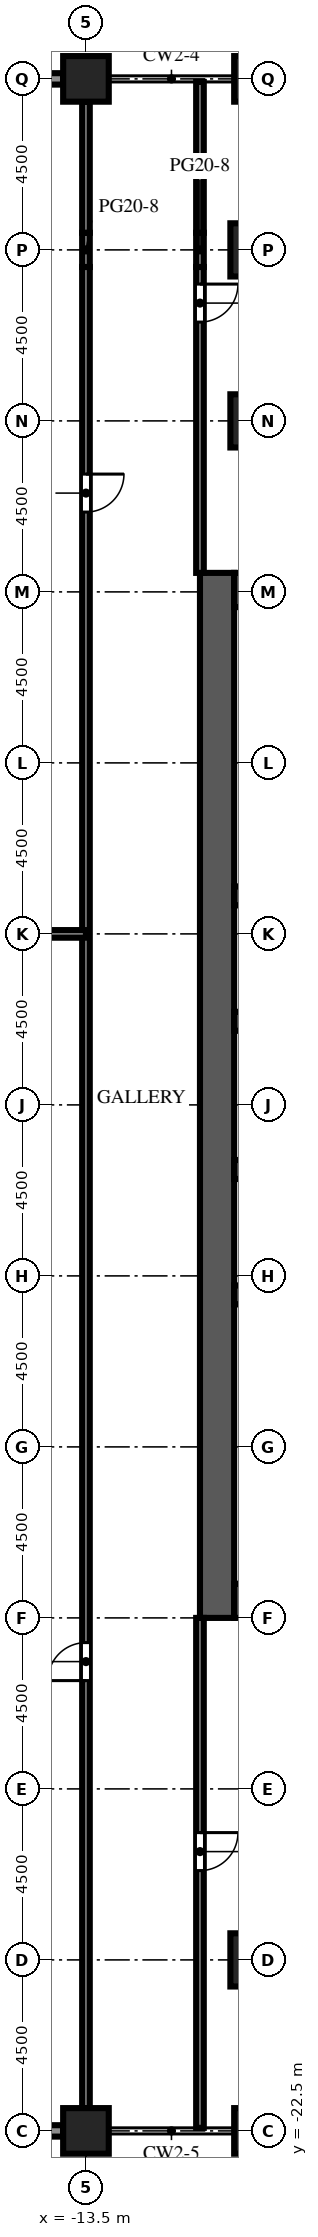
"""IFC4 building model, lengths in metres.
Left out: names, types, materials, properties, quantities, classifications, styles, units other than length and angle.
Written with IfcOpenShell. Run it as: python <this file> out.ifc"""

import sys

from ifc_helpers import new_model, si_unit, direction, frame, frame_2d, origin, origin_2d, place, context, subcontext, project, spatial, rectangle, extrude, element, fill, save


model = new_model("IFC4")
c1 = context("Model", 3, precision=1e-05, world=origin(), true_north=direction((0.0, 1.0)))
c2 = subcontext(c1, "Body", "Model", "MODEL_VIEW")
j1 = project(units=[si_unit("LENGTHUNIT", "METRE"), si_unit("PLANEANGLEUNIT", "RADIAN")], contexts=[c1])
p1 = place(None, origin())
s1 = spatial("IfcSite", under=j1, at=p1, CompositionType="ELEMENT")
p2 = place(p1, origin())
s2 = spatial("IfcBuilding", under=s1, at=p2, CompositionType="ELEMENT")
p3 = place(p2, frame((0.0, 0.0, 145.4)))
s3 = spatial("IfcBuildingStorey", under=s2, at=p3, CompositionType="ELEMENT", Elevation=145.4)
for number, where, z_axis, x_axis in (
    (1, (-13.5, -22.5, 0.0), (0.0, 0.0, 1.0), (1.0, 0.0, 0.0)),
    (2, (-13.5, 31.5, 0.0), (0.0, 0.0, 1.0), (1.0, 0.0, 0.0)),
    (3, (-9.0, -22.5, 0.0), (0.0, 0.0, 1.0), (1.0, 0.0, 0.0)),
    (4, (-9.0, 31.5, 0.0), (0.0, 0.0, 1.0), (1.0, 0.0, 0.0)),
):
    element("IfcColumn", number, at=place(p3, frame(where, z_axis=z_axis, x_axis=x_axis)), inside=s3, PredefinedType="COLUMN", context=c2, shape_type="SweptSolid", body=[
        extrude(rectangle(XDim=1.2, YDim=1.2, at=origin_2d()), origin(), (0.0, 0.0, 1.0), 6.0),
    ])
for number, where, z_axis, x_axis in (
    (5, (-9.0, -18.0, 0.0), (0.0, 0.0, 1.0), (1.0, 0.0, 0.0)),
    (6, (-9.0, 22.5, 0.0), (0.0, 0.0, 1.0), (1.0, 0.0, 0.0)),
):
    element("IfcColumn", number, at=place(p3, frame(where, z_axis=z_axis, x_axis=x_axis)), inside=s3, PredefinedType="COLUMN", context=c2, shape_type="SweptSolid", body=[
        extrude(rectangle(XDim=1.4, YDim=1.4, at=origin_2d()), origin(), (0.0, 0.0, 1.0), 6.0),
    ])
p4 = place(p3, frame((-9.0, 27.0, 0.0), z_axis=(0.0, 0.0, 1.0), x_axis=(1.0, 0.0, 0.0)))
e7 = element("IfcColumn", 7, at=p4, inside=s3, PredefinedType="COLUMN", context=c2, shape_type="SweptSolid", body=[
    extrude(rectangle(XDim=1.4, YDim=1.4, at=origin_2d()), origin(), (0.0, 0.0, 1.0), 5.4),
])
p5 = place(p3, frame((-10.05, -9.0, 0.0), z_axis=(0.0, 0.0, 1.0), x_axis=(0.0, 1.0, 0.0)))
e8 = element("IfcWall", 8, at=p5, inside=s3, PredefinedType="SHEAR", context=c2, shape_type="SweptSolid", body=[
    extrude(rectangle(XDim=27.5, YDim=0.9, at=frame_2d((13.75, 0.0))), origin(), (0.0, 0.0, 1.0), 6.0),
])
p6 = place(p5, frame((12.55, 0.0, 0.0)))
e9 = element("IfcOpeningElement", 9, at=p6, cuts=e8, PredefinedType="OPENING", context=c2, shape_type="SweptSolid", body=[
    extrude(rectangle(XDim=2.4, YDim=2.4, at=frame_2d((1.2, 1.2))), frame((0.0, 0.46, 0.0), z_axis=(0.0, -1.0, 0.0), x_axis=(1.0, 0.0, 0.0)), (0.0, 0.0, 1.0), 0.92),
])
p7 = place(p5, frame((6.825, 0.0, 0.0)))
e10 = element("IfcOpeningElement", 10, at=p7, cuts=e8, PredefinedType="OPENING", context=c2, shape_type="SweptSolid", body=[
    extrude(rectangle(XDim=1.2, YDim=2.1, at=frame_2d((0.6, 1.05))), frame((0.0, 0.46, 0.0), z_axis=(0.0, -1.0, 0.0), x_axis=(1.0, 0.0, 0.0)), (0.0, 0.0, 1.0), 0.92),
])
p8 = place(p5, frame((19.475, 0.0, 0.0)))
e11 = element("IfcOpeningElement", 11, at=p8, cuts=e8, PredefinedType="OPENING", context=c2, shape_type="SweptSolid", body=[
    extrude(rectangle(XDim=1.2, YDim=2.1, at=frame_2d((0.6, 1.05))), frame((0.0, 0.46, 0.0), z_axis=(0.0, -1.0, 0.0), x_axis=(1.0, 0.0, 0.0)), (0.0, 0.0, 1.0), 0.92),
])
for number, where, z_axis, x_axis in (
    (12, (-9.6, -8.55, 0.0), (0.0, 0.0, 1.0), (1.0, 0.0, 0.0)),
    (13, (-9.6, 18.05, 0.0), (0.0, 0.0, 1.0), (1.0, 0.0, 0.0)),
):
    element("IfcWall", number, at=place(p3, frame(where, z_axis=z_axis, x_axis=x_axis)), inside=s3, PredefinedType="SHEAR", context=c2, shape_type="SweptSolid", body=[
        extrude(rectangle(XDim=10.2, YDim=0.9, at=frame_2d((5.1, 0.0))), origin(), (0.0, 0.0, 1.0), 6.0),
    ])
p9 = place(p3, frame((-9.6, -0.5, 0.0), z_axis=(0.0, 0.0, 1.0), x_axis=(1.0, 0.0, 0.0)))
e14 = element("IfcWall", 14, at=p9, inside=s3, PredefinedType="SHEAR", context=c2, shape_type="SweptSolid", body=[
    extrude(rectangle(XDim=10.2, YDim=0.5, at=frame_2d((5.1, 0.0))), origin(), (0.0, 0.0, 1.0), 6.0),
])
p10 = place(p3, frame((-9.6, 2.8, 0.0), z_axis=(0.0, 0.0, 1.0), x_axis=(1.0, 0.0, 0.0)))
e15 = element("IfcWall", 15, at=p10, inside=s3, PredefinedType="SHEAR", context=c2, shape_type="SweptSolid", body=[
    extrude(rectangle(XDim=10.2, YDim=0.5, at=frame_2d((5.1, 0.0))), origin(), (0.0, 0.0, 1.0), 6.0),
])
p11 = place(p10, frame((0.562, 0.0, 0.0)))
e16 = element("IfcOpeningElement", 16, at=p11, cuts=e15, PredefinedType="OPENING", context=c2, shape_type="SweptSolid", body=[
    extrude(rectangle(XDim=1.1, YDim=2.1, at=frame_2d((0.55, 1.05))), frame((0.0, 0.26, 0.0), z_axis=(0.0, -1.0, 0.0), x_axis=(1.0, 0.0, 0.0)), (0.0, 0.0, 1.0), 0.52),
])
p12 = place(p10, frame((3.238, 0.0, 0.0)))
e17 = element("IfcOpeningElement", 17, at=p12, cuts=e15, PredefinedType="OPENING", context=c2, shape_type="SweptSolid", body=[
    extrude(rectangle(XDim=1.1, YDim=2.1, at=frame_2d((0.55, 1.05))), frame((0.0, 0.26, 0.0), z_axis=(0.0, -1.0, 0.0), x_axis=(1.0, 0.0, 0.0)), (0.0, 0.0, 1.0), 0.52),
])
p13 = place(p10, frame((8.538, 0.0, 0.0)))
e18 = element("IfcOpeningElement", 18, at=p13, cuts=e15, PredefinedType="OPENING", context=c2, shape_type="SweptSolid", body=[
    extrude(rectangle(XDim=1.1, YDim=2.1, at=frame_2d((0.55, 1.05))), frame((0.0, 0.26, 0.0), z_axis=(0.0, -1.0, 0.0), x_axis=(1.0, 0.0, 0.0)), (0.0, 0.0, 1.0), 0.52),
])
p14 = place(p3, frame((-9.6, 6.7, 0.0), z_axis=(0.0, 0.0, 1.0), x_axis=(1.0, 0.0, 0.0)))
e19 = element("IfcWall", 19, at=p14, inside=s3, PredefinedType="SHEAR", context=c2, shape_type="SweptSolid", body=[
    extrude(rectangle(XDim=10.2, YDim=0.5, at=frame_2d((5.1, 0.0))), origin(), (0.0, 0.0, 1.0), 6.0),
])
p15 = place(p14, frame((0.562, 0.0, 0.0)))
e20 = element("IfcOpeningElement", 20, at=p15, cuts=e19, PredefinedType="OPENING", context=c2, shape_type="SweptSolid", body=[
    extrude(rectangle(XDim=1.1, YDim=2.1, at=frame_2d((0.55, 1.05))), frame((0.0, 0.26, 0.0), z_axis=(0.0, -1.0, 0.0), x_axis=(1.0, 0.0, 0.0)), (0.0, 0.0, 1.0), 0.52),
])
p16 = place(p14, frame((3.288, 0.0, 0.0)))
e21 = element("IfcOpeningElement", 21, at=p16, cuts=e19, PredefinedType="OPENING", context=c2, shape_type="SweptSolid", body=[
    extrude(rectangle(XDim=1.0, YDim=2.1, at=frame_2d((0.5, 1.05))), frame((0.0, 0.26, 0.0), z_axis=(0.0, -1.0, 0.0), x_axis=(1.0, 0.0, 0.0)), (0.0, 0.0, 1.0), 0.52),
])
p17 = place(p14, frame((5.913, 0.0, 0.0)))
e22 = element("IfcOpeningElement", 22, at=p17, cuts=e19, PredefinedType="OPENING", context=c2, shape_type="SweptSolid", body=[
    extrude(rectangle(XDim=1.0, YDim=2.1, at=frame_2d((0.5, 1.05))), frame((0.0, 0.26, 0.0), z_axis=(0.0, -1.0, 0.0), x_axis=(1.0, 0.0, 0.0)), (0.0, 0.0, 1.0), 0.52),
])
p18 = place(p14, frame((8.587, 0.0, 0.0)))
e23 = element("IfcOpeningElement", 23, at=p18, cuts=e19, PredefinedType="OPENING", context=c2, shape_type="SweptSolid", body=[
    extrude(rectangle(XDim=1.0, YDim=2.1, at=frame_2d((0.5, 1.05))), frame((0.0, 0.26, 0.0), z_axis=(0.0, -1.0, 0.0), x_axis=(1.0, 0.0, 0.0)), (0.0, 0.0, 1.0), 0.52),
])
p19 = place(p3, frame((-9.6, 10.0, 0.0), z_axis=(0.0, 0.0, 1.0), x_axis=(1.0, 0.0, 0.0)))
e24 = element("IfcWall", 24, at=p19, inside=s3, PredefinedType="SHEAR", context=c2, shape_type="SweptSolid", body=[
    extrude(rectangle(XDim=10.2, YDim=0.5, at=frame_2d((5.1, 0.0))), origin(), (0.0, 0.0, 1.0), 6.0),
])
p20 = place(p3, frame((-14.1, -22.5, 0.0), z_axis=(0.0, 0.0, 1.0), x_axis=(-1.0, 0.0, 0.0)))
e25 = element("IfcWall", 25, at=p20, inside=s3, PredefinedType="SOLIDWALL", context=c2, shape_type="SweptSolid", body=[
    extrude(rectangle(XDim=3.3, YDim=0.3, at=frame_2d((1.65, 0.0))), origin(), (0.0, 0.0, 1.0), 4.5),
])
p21 = place(p20, frame((1.15, 0.0, 0.0)))
e26 = element("IfcOpeningElement", 26, at=p21, cuts=e25, PredefinedType="OPENING", context=c2, shape_type="SweptSolid", body=[
    extrude(rectangle(XDim=1.0, YDim=2.2, at=frame_2d((0.5, 1.1))), frame((0.0, 0.16, 0.0), z_axis=(0.0, -1.0, 0.0), x_axis=(1.0, 0.0, 0.0)), (0.0, 0.0, 1.0), 0.32),
])
p22 = place(p3, frame((-17.4, 31.5, 0.0), z_axis=(0.0, 0.0, 1.0), x_axis=(1.0, 0.0, 0.0)))
e27 = element("IfcWall", 27, at=p22, inside=s3, PredefinedType="SOLIDWALL", context=c2, shape_type="SweptSolid", body=[
    extrude(rectangle(XDim=3.3, YDim=0.3, at=frame_2d((1.65, 0.0))), origin(), (0.0, 0.0, 1.0), 4.5),
])
p23 = place(p22, frame((1.15, 0.0, 0.0)))
e28 = element("IfcOpeningElement", 28, at=p23, cuts=e27, PredefinedType="OPENING", context=c2, shape_type="SweptSolid", body=[
    extrude(rectangle(XDim=1.0, YDim=2.2, at=frame_2d((0.5, 1.1))), frame((0.0, 0.16, 0.0), z_axis=(0.0, -1.0, 0.0), x_axis=(1.0, 0.0, 0.0)), (0.0, 0.0, 1.0), 0.32),
])
p24 = place(p3, frame((-13.5, -21.9, 0.0), z_axis=(0.0, 0.0, 1.0), x_axis=(0.0, 1.0, 0.0)))
e29 = element("IfcWall", 29, at=p24, inside=s3, PredefinedType="PARTITIONING", context=c2, shape_type="SweptSolid", body=[
    extrude(rectangle(XDim=48.45, YDim=0.2, at=frame_2d((24.225, 0.0))), origin(), (0.0, 0.0, 1.0), 5.4),
])
p25 = place(p24, frame((11.25, 0.0, 0.0)))
e30 = element("IfcOpeningElement", 30, at=p25, cuts=e29, PredefinedType="OPENING", context=c2, shape_type="SweptSolid", body=[
    extrude(rectangle(XDim=1.0, YDim=2.1, at=frame_2d((0.5, 1.05))), frame((0.0, 0.11, 0.0), z_axis=(0.0, -1.0, 0.0), x_axis=(1.0, 0.0, 0.0)), (0.0, 0.0, 1.0), 0.22),
])
p26 = place(p24, frame((42.0, 0.0, 0.0)))
e31 = element("IfcOpeningElement", 31, at=p26, cuts=e29, PredefinedType="OPENING", context=c2, shape_type="SweptSolid", body=[
    extrude(rectangle(XDim=1.0, YDim=2.1, at=frame_2d((0.5, 1.05))), frame((0.0, 0.11, 0.0), z_axis=(0.0, -1.0, 0.0), x_axis=(1.0, 0.0, 0.0)), (0.0, 0.0, 1.0), 0.22),
])
p27 = place(p3, frame((-13.5, 26.55, 0.0), z_axis=(0.0, 0.0, 1.0), x_axis=(0.0, 1.0, 0.0)))
e32 = element("IfcWall", 32, at=p27, inside=s3, PredefinedType="PARTITIONING", context=c2, shape_type="SweptSolid", body=[
    extrude(rectangle(XDim=0.9, YDim=0.2, at=frame_2d((0.45, 0.0))), origin(), (0.0, 0.0, 1.0), 3.57),
])
p28 = place(p3, frame((-13.5, 27.45, 0.0), z_axis=(0.0, 0.0, 1.0), x_axis=(0.0, 1.0, 0.0)))
e33 = element("IfcWall", 33, at=p28, inside=s3, PredefinedType="PARTITIONING", context=c2, shape_type="SweptSolid", body=[
    extrude(rectangle(XDim=3.45, YDim=0.2, at=frame_2d((1.725, 0.0))), origin(), (0.0, 0.0, 1.0), 5.4),
])
p29 = place(p3, frame((-10.5, -9.0, 0.0), z_axis=(0.0, 0.0, 1.0), x_axis=(0.0, -1.0, 0.0)))
e34 = element("IfcWall", 34, at=p29, inside=s3, PredefinedType="PARTITIONING", context=c2, shape_type="SweptSolid", body=[
    extrude(rectangle(XDim=13.42, YDim=0.2, at=frame_2d((6.71, 0.0))), origin(), (0.0, 0.0, 1.0), 5.4),
])
p30 = place(p29, frame((5.65, 0.0, 0.0)))
e35 = element("IfcOpeningElement", 35, at=p30, cuts=e34, PredefinedType="OPENING", context=c2, shape_type="SweptSolid", body=[
    extrude(rectangle(XDim=1.0, YDim=2.1, at=frame_2d((0.5, 1.05))), frame((0.0, 0.11, 0.0), z_axis=(0.0, -1.0, 0.0), x_axis=(1.0, 0.0, 0.0)), (0.0, 0.0, 1.0), 0.22),
])
p31 = place(p3, frame((-10.5, 26.55, 0.0), z_axis=(0.0, 0.0, 1.0), x_axis=(0.0, -1.0, 0.0)))
e36 = element("IfcWall", 36, at=p31, inside=s3, PredefinedType="PARTITIONING", context=c2, shape_type="SweptSolid", body=[
    extrude(rectangle(XDim=8.05, YDim=0.2, at=frame_2d((4.025, 0.0))), origin(), (0.0, 0.0, 1.0), 5.4),
])
p32 = place(p31, frame((0.45, 0.0, 0.0)))
e37 = element("IfcOpeningElement", 37, at=p32, cuts=e36, PredefinedType="OPENING", context=c2, shape_type="SweptSolid", body=[
    extrude(rectangle(XDim=1.0, YDim=2.1, at=frame_2d((0.5, 1.05))), frame((0.0, 0.11, 0.0), z_axis=(0.0, -1.0, 0.0), x_axis=(1.0, 0.0, 0.0)), (0.0, 0.0, 1.0), 0.22),
])
p33 = place(p3, frame((-10.5, 26.55, 0.0), z_axis=(0.0, 0.0, 1.0), x_axis=(0.0, 1.0, 0.0)))
e38 = element("IfcWall", 38, at=p33, inside=s3, PredefinedType="PARTITIONING", context=c2, shape_type="SweptSolid", body=[
    extrude(rectangle(XDim=0.9, YDim=0.2, at=frame_2d((0.45, 0.0))), origin(), (0.0, 0.0, 1.0), 3.57),
])
p34 = place(p3, frame((-10.5, 27.45, 0.0), z_axis=(0.0, 0.0, 1.0), x_axis=(0.0, 1.0, 0.0)))
e39 = element("IfcWall", 39, at=p34, inside=s3, PredefinedType="PARTITIONING", context=c2, shape_type="SweptSolid", body=[
    extrude(rectangle(XDim=3.97, YDim=0.2, at=frame_2d((1.985, 0.0))), origin(), (0.0, 0.0, 1.0), 5.4),
])
p35 = place(p3, frame((-17.3, 9.0, 0.0), z_axis=(0.0, 0.0, 1.0), x_axis=(1.0, 0.0, 0.0)))
e40 = element("IfcWall", 40, at=p35, inside=s3, PredefinedType="PARTITIONING", context=c2, shape_type="SweptSolid", body=[
    extrude(rectangle(XDim=3.8, YDim=0.2, at=frame_2d((1.9, 0.0))), origin(), (0.0, 0.0, 1.0), 5.4),
])
p36 = place(p6, origin())
e41 = element("IfcDoor", 41, at=p36, inside=s3, OperationType="DOUBLE_DOOR_DOUBLE_SWING", PredefinedType="DOOR", context=c2, shape_type="SweptSolid", body=[
    extrude(rectangle(XDim=2.4, YDim=2.4, at=frame_2d((1.2, 1.2))), frame((0.0, 0.025, 0.0), z_axis=(0.0, -1.0, 0.0), x_axis=(1.0, 0.0, 0.0)), (0.0, 0.0, 1.0), 0.05),
])
fill(e9, e41)
p37 = place(p7, origin())
e42 = element("IfcDoor", 42, at=p37, inside=s3, OperationType="SINGLE_SWING_LEFT", PredefinedType="DOOR", context=c2, shape_type="SweptSolid", body=[
    extrude(rectangle(XDim=1.2, YDim=2.1, at=frame_2d((0.6, 1.05))), frame((0.0, 0.025, 0.0), z_axis=(0.0, -1.0, 0.0), x_axis=(1.0, 0.0, 0.0)), (0.0, 0.0, 1.0), 0.05),
])
fill(e10, e42)
p38 = place(p8, origin())
e43 = element("IfcDoor", 43, at=p38, inside=s3, OperationType="SINGLE_SWING_LEFT", PredefinedType="DOOR", context=c2, shape_type="SweptSolid", body=[
    extrude(rectangle(XDim=1.2, YDim=2.1, at=frame_2d((0.6, 1.05))), frame((0.0, 0.025, 0.0), z_axis=(0.0, -1.0, 0.0), x_axis=(1.0, 0.0, 0.0)), (0.0, 0.0, 1.0), 0.05),
])
fill(e11, e43)
p39 = place(p25, origin())
e44 = element("IfcDoor", 44, at=p39, inside=s3, OperationType="SINGLE_SWING_LEFT", PredefinedType="DOOR", context=c2, shape_type="SweptSolid", body=[
    extrude(rectangle(XDim=1.0, YDim=2.1, at=frame_2d((0.5, 1.05))), frame((0.0, 0.025, 0.0), z_axis=(0.0, -1.0, 0.0), x_axis=(1.0, 0.0, 0.0)), (0.0, 0.0, 1.0), 0.05),
])
fill(e30, e44)
p40 = place(p26, origin())
e45 = element("IfcDoor", 45, at=p40, inside=s3, OperationType="SINGLE_SWING_RIGHT", PredefinedType="DOOR", context=c2, shape_type="SweptSolid", body=[
    extrude(rectangle(XDim=1.0, YDim=2.1, at=frame_2d((0.5, 1.05))), frame((0.0, 0.025, 0.0), z_axis=(0.0, -1.0, 0.0), x_axis=(1.0, 0.0, 0.0)), (0.0, 0.0, 1.0), 0.05),
])
fill(e31, e45)
p41 = place(p30, origin())
e46 = element("IfcDoor", 46, at=p41, inside=s3, OperationType="SINGLE_SWING_LEFT", PredefinedType="DOOR", context=c2, shape_type="SweptSolid", body=[
    extrude(rectangle(XDim=1.0, YDim=2.1, at=frame_2d((0.5, 1.05))), frame((0.0, 0.025, 0.0), z_axis=(0.0, -1.0, 0.0), x_axis=(1.0, 0.0, 0.0)), (0.0, 0.0, 1.0), 0.05),
])
fill(e35, e46)
p42 = place(p32, origin())
e47 = element("IfcDoor", 47, at=p42, inside=s3, OperationType="SINGLE_SWING_LEFT", PredefinedType="DOOR", context=c2, shape_type="SweptSolid", body=[
    extrude(rectangle(XDim=1.0, YDim=2.1, at=frame_2d((0.5, 1.05))), frame((0.0, 0.025, 0.0), z_axis=(0.0, -1.0, 0.0), x_axis=(1.0, 0.0, 0.0)), (0.0, 0.0, 1.0), 0.05),
])
fill(e37, e47)
save(model, sys.argv[1])
